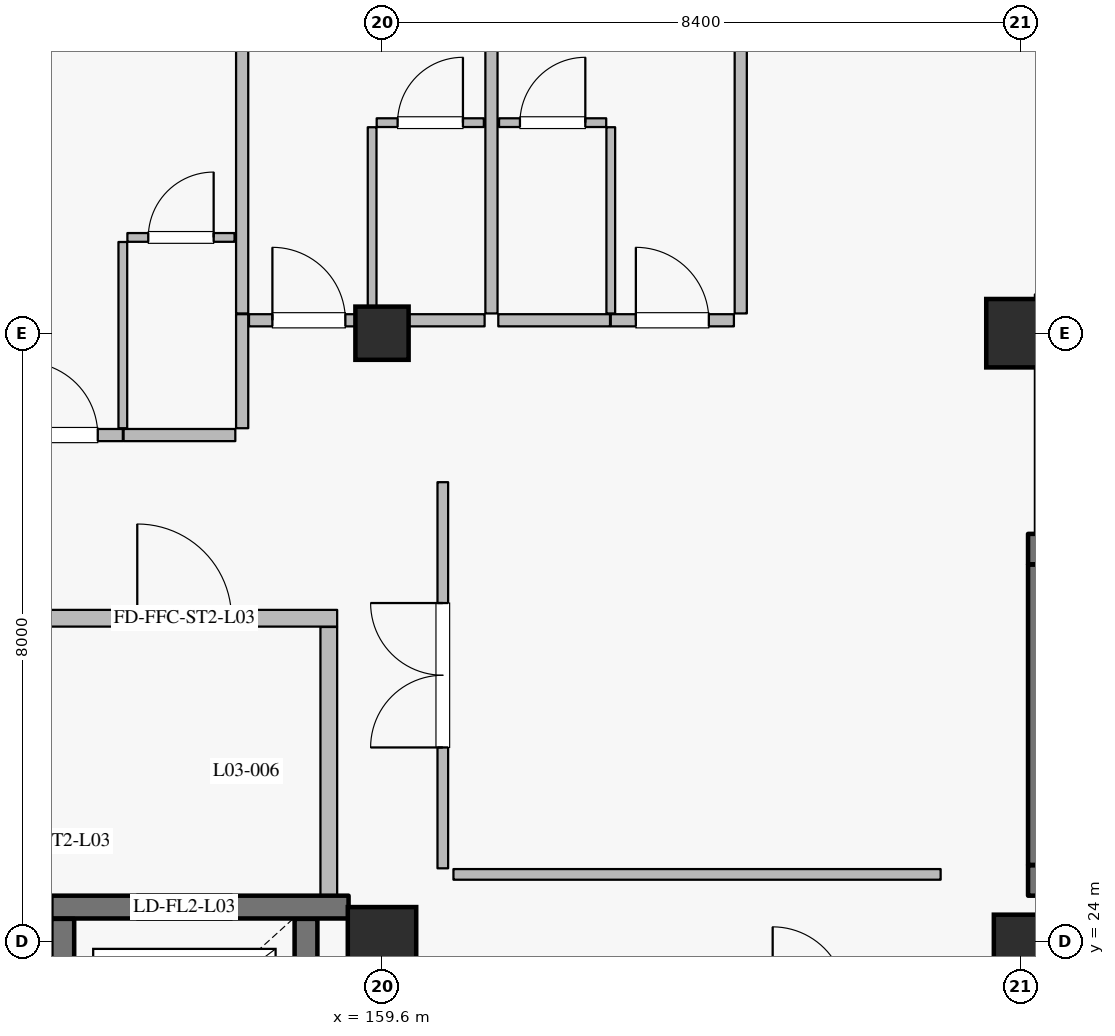
"""IFC4 building model, lengths in metres.
Left out: names, types, materials, properties, quantities, classifications, styles, units other than length and angle.
Written with IfcOpenShell. Run it as: python <this file> out.ifc"""

import sys

from ifc_helpers import new_model, si_unit, direction, frame, frame_2d, origin, origin_2d, place, context, subcontext, project, spatial, rectangle, extrude, element, fill, save


model = new_model("IFC4")
c1 = context("Model", 3, precision=1e-05, world=origin(), true_north=direction((0.0, 1.0)))
c2 = subcontext(c1, "Body", "Model", "MODEL_VIEW")
j1 = project(units=[si_unit("LENGTHUNIT", "METRE"), si_unit("PLANEANGLEUNIT", "RADIAN")], contexts=[c1])
p1 = place(None, origin())
s1 = spatial("IfcSite", under=j1, at=p1, CompositionType="ELEMENT")
p2 = place(p1, origin())
s2 = spatial("IfcBuilding", under=s1, at=p2, CompositionType="ELEMENT")
p3 = place(p2, frame((0.0, 0.0, 16.2)))
s3 = spatial("IfcBuildingStorey", under=s2, at=p3, CompositionType="ELEMENT", Elevation=16.2)
for number, where, z_axis, x_axis in (
    (1, (159.6, 24.0, 0.0), (0.0, 0.0, 1.0), (1.0, 0.0, 0.0)),
    (2, (168.0, 32.0, 0.0), (0.0, 0.0, 1.0), (1.0, 0.0, 0.0)),
):
    element("IfcColumn", number, at=place(p3, frame(where, z_axis=z_axis, x_axis=x_axis)), inside=s3, PredefinedType="COLUMN", context=c2, shape_type="SweptSolid", body=[
        extrude(rectangle(XDim=0.9, YDim=0.9, at=origin_2d()), origin(), (0.0, 0.0, 1.0), 4.8),
    ])
for number, where, z_axis, x_axis in (
    (3, (159.6, 32.0, 0.0), (0.0, 0.0, 1.0), (1.0, 0.0, 0.0)),
    (4, (168.0, 24.0, 0.0), (0.0, 0.0, 1.0), (1.0, 0.0, 0.0)),
):
    element("IfcColumn", number, at=place(p3, frame(where, z_axis=z_axis, x_axis=x_axis)), inside=s3, PredefinedType="COLUMN", context=c2, shape_type="SweptSolid", body=[
        extrude(rectangle(XDim=0.7, YDim=0.7, at=origin_2d()), origin(), (0.0, 0.0, 1.0), 4.8),
    ])
p4 = place(p3, frame((158.6, 21.705, 0.0), z_axis=(0.0, 0.0, 1.0), x_axis=(0.0, 1.0, 0.0)))
e5 = element("IfcWall", 5, at=p4, inside=s3, PredefinedType="SHEAR", context=c2, shape_type="SweptSolid", body=[
    extrude(rectangle(XDim=2.59, YDim=0.3, at=frame_2d((1.295, 0.0))), origin(), (0.0, 0.0, 1.0), 4.535),
])
p5 = place(p3, frame((159.16, 24.45, 0.0), z_axis=(0.0, 0.0, 1.0), x_axis=(-1.0, 0.0, 0.0)))
e6 = element("IfcWall", 6, at=p5, inside=s3, PredefinedType="SHEAR", context=c2, shape_type="SweptSolid", body=[
    extrude(rectangle(XDim=3.91, YDim=0.3, at=frame_2d((1.955, 0.0))), origin(), (0.0, 0.0, 1.0), 4.535),
])
p6 = place(p5, frame((1.535, 0.0, 0.0)))
e7 = element("IfcOpeningElement", 7, at=p6, cuts=e6, PredefinedType="OPENING", context=c2, shape_type="SweptSolid", body=[
    extrude(rectangle(XDim=1.25, YDim=2.25, at=frame_2d((0.625, 1.125))), frame((0.0, 0.16, 0.0), z_axis=(0.0, -1.0, 0.0), x_axis=(1.0, 0.0, 0.0)), (0.0, 0.0, 1.0), 0.32),
])
p7 = place(p3, frame((155.4, 24.295, 0.0), z_axis=(0.0, 0.0, 1.0), x_axis=(0.0, -1.0, 0.0)))
e8 = element("IfcWall", 8, at=p7, inside=s3, PredefinedType="SHEAR", context=c2, shape_type="SweptSolid", body=[
    extrude(rectangle(XDim=2.59, YDim=0.3, at=frame_2d((1.295, 0.0))), origin(), (0.0, 0.0, 1.0), 4.535),
])
p8 = place(p3, frame((158.9, 24.605, 0.0), z_axis=(0.0, 0.0, 1.0), x_axis=(0.0, 1.0, 0.0)))
e9 = element("IfcWall", 9, at=p8, inside=s3, PredefinedType="PARTITIONING", context=c2, shape_type="SweptSolid", body=[
    extrude(rectangle(XDim=3.53, YDim=0.22, at=frame_2d((1.765, 0.0))), origin(), (0.0, 0.0, 1.0), 4.535),
])
p9 = place(p3, frame((154.99, 28.25, 0.0), z_axis=(0.0, 0.0, 1.0), x_axis=(1.0, 0.0, 0.0)))
e10 = element("IfcWall", 10, at=p9, inside=s3, PredefinedType="PARTITIONING", context=c2, shape_type="SweptSolid", body=[
    extrude(rectangle(XDim=4.02, YDim=0.22, at=frame_2d((2.01, 0.0))), origin(), (0.0, 0.0, 1.0), 4.535),
])
p10 = place(p9, frame((1.39, 0.0, 0.0)))
e11 = element("IfcOpeningElement", 11, at=p10, cuts=e10, PredefinedType="OPENING", context=c2, shape_type="SweptSolid", body=[
    extrude(rectangle(XDim=1.24, YDim=2.2, at=frame_2d((0.62, 1.1))), frame((0.0, 0.12, 0.0), z_axis=(0.0, -1.0, 0.0), x_axis=(1.0, 0.0, 0.0)), (0.0, 0.0, 1.0), 0.24),
])
p11 = place(p3, frame((168.1, 24.8, 0.0), z_axis=(0.0, 0.0, 1.0), x_axis=(1.0, 0.0, 0.0)))
e12 = element("IfcWall", 12, at=p11, inside=s3, PredefinedType="SHEAR", context=c2, shape_type="SweptSolid", body=[
    extrude(rectangle(XDim=8.2, YDim=0.4, at=frame_2d((4.1, 0.0))), origin(), (0.0, 0.0, 1.0), 4.535),
])
p12 = place(p3, frame((168.1, 29.16, 0.0), z_axis=(0.0, 0.0, 1.0), x_axis=(1.0, 0.0, 0.0)))
e13 = element("IfcWall", 13, at=p12, inside=s3, PredefinedType="SHEAR", context=c2, shape_type="SweptSolid", body=[
    extrude(rectangle(XDim=8.2, YDim=0.4, at=frame_2d((4.1, 0.0))), origin(), (0.0, 0.0, 1.0), 4.535),
])
p13 = place(p12, frame((0.43, 0.0, 0.0)))
e14 = element("IfcOpeningElement", 14, at=p13, cuts=e13, PredefinedType="OPENING", context=c2, shape_type="SweptSolid", body=[
    extrude(rectangle(XDim=1.16, YDim=2.2, at=frame_2d((0.58, 1.1))), frame((0.0, 0.21, 0.0), z_axis=(0.0, -1.0, 0.0), x_axis=(1.0, 0.0, 0.0)), (0.0, 0.0, 1.0), 0.42),
])
p14 = place(p3, frame((168.3, 25.005, 0.0), z_axis=(0.0, 0.0, 1.0), x_axis=(0.0, 1.0, 0.0)))
e15 = element("IfcWall", 15, at=p14, inside=s3, PredefinedType="SHEAR", context=c2, shape_type="SweptSolid", body=[
    extrude(rectangle(XDim=3.95, YDim=0.4, at=frame_2d((1.975, 0.0))), origin(), (0.0, 0.0, 1.0), 4.535),
])
p15 = place(p3, frame((168.3, 29.365, 0.0), z_axis=(0.0, 0.0, 1.0), x_axis=(0.0, 1.0, 0.0)))
e16 = element("IfcWall", 16, at=p15, inside=s3, PredefinedType="PARTITIONING", context=c2, shape_type="SweptSolid", body=[
    extrude(rectangle(XDim=2.92, YDim=0.22, at=frame_2d((1.46, 0.0))), origin(), (0.0, 0.0, 1.0), 4.535),
])
p16 = place(p3, frame((168.19, 32.4, 0.0), z_axis=(0.0, 0.0, 1.0), x_axis=(1.0, 0.0, 0.0)))
e17 = element("IfcWall", 17, at=p16, inside=s3, PredefinedType="PARTITIONING", context=c2, shape_type="SweptSolid", body=[
    extrude(rectangle(XDim=4.22, YDim=0.22, at=frame_2d((2.11, 0.0))), origin(), (0.0, 0.0, 1.0), 4.535),
])
p17 = place(p16, frame((1.55, 0.0, 0.0)))
e18 = element("IfcOpeningElement", 18, at=p17, cuts=e17, PredefinedType="OPENING", context=c2, shape_type="SweptSolid", body=[
    extrude(rectangle(XDim=1.12, YDim=2.2, at=frame_2d((0.56, 1.1))), frame((0.0, 0.12, 0.0), z_axis=(0.0, -1.0, 0.0), x_axis=(1.0, 0.0, 0.0)), (0.0, 0.0, 1.0), 0.24),
])
p18 = place(p3, frame((154.57, 30.66, 0.0), z_axis=(0.0, 0.0, 1.0), x_axis=(1.0, 0.0, 0.0)))
e19 = element("IfcWall", 19, at=p18, inside=s3, PredefinedType="PARTITIONING", context=c2, shape_type="SweptSolid", body=[
    extrude(rectangle(XDim=1.62, YDim=0.16, at=frame_2d((0.81, 0.0))), origin(), (0.0, 0.0, 1.0), 4.535),
])
p19 = place(p18, frame((0.33, 0.0, 0.0)))
e20 = element("IfcOpeningElement", 20, at=p19, cuts=e19, PredefinedType="OPENING", context=c2, shape_type="SweptSolid", body=[
    extrude(rectangle(XDim=0.96, YDim=2.2, at=frame_2d((0.48, 1.1))), frame((0.0, 0.09, 0.0), z_axis=(0.0, -1.0, 0.0), x_axis=(1.0, 0.0, 0.0)), (0.0, 0.0, 1.0), 0.18),
])
p20 = place(p3, frame((156.2, 30.66, 0.0), z_axis=(0.0, 0.0, 1.0), x_axis=(1.0, 0.0, 0.0)))
e21 = element("IfcWall", 21, at=p20, inside=s3, PredefinedType="PARTITIONING", context=c2, shape_type="SweptSolid", body=[
    extrude(rectangle(XDim=1.47, YDim=0.16, at=frame_2d((0.735, 0.0))), origin(), (0.0, 0.0, 1.0), 4.535),
])
p21 = place(p3, frame((156.19, 30.75, 0.0), z_axis=(0.0, 0.0, 1.0), x_axis=(0.0, 1.0, 0.0)))
e22 = element("IfcWall", 22, at=p21, inside=s3, PredefinedType="PARTITIONING", context=c2, shape_type="SweptSolid", body=[
    extrude(rectangle(XDim=2.45, YDim=0.115, at=frame_2d((1.225, 0.0))), origin(), (0.0, 0.0, 1.0), 4.535),
])
p22 = place(p3, frame((156.25, 33.26, 0.0), z_axis=(0.0, 0.0, 1.0), x_axis=(1.0, 0.0, 0.0)))
e23 = element("IfcWall", 23, at=p22, inside=s3, PredefinedType="PARTITIONING", context=c2, shape_type="SweptSolid", body=[
    extrude(rectangle(XDim=1.41, YDim=0.115, at=frame_2d((0.705, 0.0))), origin(), (0.0, 0.0, 1.0), 4.535),
])
p23 = place(p22, frame((0.275, 0.0, 0.0)))
e24 = element("IfcOpeningElement", 24, at=p23, cuts=e23, PredefinedType="OPENING", context=c2, shape_type="SweptSolid", body=[
    extrude(rectangle(XDim=0.86, YDim=2.12, at=frame_2d((0.43, 1.06))), frame((0.0, 0.067, 0.0), z_axis=(0.0, -1.0, 0.0), x_axis=(1.0, 0.0, 0.0)), (0.0, 0.0, 1.0), 0.135),
])
p24 = place(p3, frame((157.76, 30.75, 0.0), z_axis=(0.0, 0.0, 1.0), x_axis=(0.0, 1.0, 0.0)))
e25 = element("IfcWall", 25, at=p24, inside=s3, PredefinedType="PARTITIONING", context=c2, shape_type="SweptSolid", body=[
    extrude(rectangle(XDim=1.5, YDim=0.16, at=frame_2d((0.75, 0.0))), origin(), (0.0, 0.0, 1.0), 4.535),
])
p25 = place(p3, frame((157.85, 32.17, 0.0), z_axis=(0.0, 0.0, 1.0), x_axis=(1.0, 0.0, 0.0)))
e26 = element("IfcWall", 26, at=p25, inside=s3, PredefinedType="PARTITIONING", context=c2, shape_type="SweptSolid", body=[
    extrude(rectangle(XDim=1.62, YDim=0.16, at=frame_2d((0.81, 0.0))), origin(), (0.0, 0.0, 1.0), 4.535),
])
p26 = place(p25, frame((0.308, 0.0, 0.0)))
e27 = element("IfcOpeningElement", 27, at=p26, cuts=e26, PredefinedType="OPENING", context=c2, shape_type="SweptSolid", body=[
    extrude(rectangle(XDim=0.96, YDim=2.2, at=frame_2d((0.48, 1.1))), frame((0.0, 0.09, 0.0), z_axis=(0.0, -1.0, 0.0), x_axis=(1.0, 0.0, 0.0)), (0.0, 0.0, 1.0), 0.18),
])
p27 = place(p3, frame((159.48, 32.17, 0.0), z_axis=(0.0, 0.0, 1.0), x_axis=(1.0, 0.0, 0.0)))
e28 = element("IfcWall", 28, at=p27, inside=s3, PredefinedType="PARTITIONING", context=c2, shape_type="SweptSolid", body=[
    extrude(rectangle(XDim=1.47, YDim=0.16, at=frame_2d((0.735, 0.0))), origin(), (0.0, 0.0, 1.0), 4.535),
])
p28 = place(p3, frame((159.47, 32.26, 0.0), z_axis=(0.0, 0.0, 1.0), x_axis=(0.0, 1.0, 0.0)))
e29 = element("IfcWall", 29, at=p28, inside=s3, PredefinedType="PARTITIONING", context=c2, shape_type="SweptSolid", body=[
    extrude(rectangle(XDim=2.45, YDim=0.115, at=frame_2d((1.225, 0.0))), origin(), (0.0, 0.0, 1.0), 4.535),
])
p29 = place(p3, frame((159.53, 34.77, 0.0), z_axis=(0.0, 0.0, 1.0), x_axis=(1.0, 0.0, 0.0)))
e30 = element("IfcWall", 30, at=p29, inside=s3, PredefinedType="PARTITIONING", context=c2, shape_type="SweptSolid", body=[
    extrude(rectangle(XDim=1.41, YDim=0.115, at=frame_2d((0.705, 0.0))), origin(), (0.0, 0.0, 1.0), 4.535),
])
p30 = place(p29, frame((0.275, 0.0, 0.0)))
e31 = element("IfcOpeningElement", 31, at=p30, cuts=e30, PredefinedType="OPENING", context=c2, shape_type="SweptSolid", body=[
    extrude(rectangle(XDim=0.86, YDim=2.12, at=frame_2d((0.43, 1.06))), frame((0.0, 0.067, 0.0), z_axis=(0.0, -1.0, 0.0), x_axis=(1.0, 0.0, 0.0)), (0.0, 0.0, 1.0), 0.135),
])
p31 = place(p3, frame((157.76, 32.26, 0.0), z_axis=(0.0, 0.0, 1.0), x_axis=(0.0, 1.0, 0.0)))
e32 = element("IfcWall", 32, at=p31, inside=s3, PredefinedType="PARTITIONING", context=c2, shape_type="SweptSolid", body=[
    extrude(rectangle(XDim=7.4, YDim=0.16, at=frame_2d((3.7, 0.0))), origin(), (0.0, 0.0, 1.0), 4.535),
])
p32 = place(p3, frame((161.13, 32.17, 0.0), z_axis=(0.0, 0.0, 1.0), x_axis=(1.0, 0.0, 0.0)))
e33 = element("IfcWall", 33, at=p32, inside=s3, PredefinedType="PARTITIONING", context=c2, shape_type="SweptSolid", body=[
    extrude(rectangle(XDim=1.47, YDim=0.16, at=frame_2d((0.735, 0.0))), origin(), (0.0, 0.0, 1.0), 4.535),
])
p33 = place(p3, frame((162.61, 32.17, 0.0), z_axis=(0.0, 0.0, 1.0), x_axis=(1.0, 0.0, 0.0)))
e34 = element("IfcWall", 34, at=p33, inside=s3, PredefinedType="PARTITIONING", context=c2, shape_type="SweptSolid", body=[
    extrude(rectangle(XDim=1.62, YDim=0.16, at=frame_2d((0.81, 0.0))), origin(), (0.0, 0.0, 1.0), 4.535),
])
p34 = place(p33, frame((0.33, 0.0, 0.0)))
e35 = element("IfcOpeningElement", 35, at=p34, cuts=e34, PredefinedType="OPENING", context=c2, shape_type="SweptSolid", body=[
    extrude(rectangle(XDim=0.96, YDim=2.2, at=frame_2d((0.48, 1.1))), frame((0.0, 0.09, 0.0), z_axis=(0.0, -1.0, 0.0), x_axis=(1.0, 0.0, 0.0)), (0.0, 0.0, 1.0), 0.18),
])
p35 = place(p3, frame((162.61, 32.26, 0.0), z_axis=(0.0, 0.0, 1.0), x_axis=(0.0, 1.0, 0.0)))
e36 = element("IfcWall", 36, at=p35, inside=s3, PredefinedType="PARTITIONING", context=c2, shape_type="SweptSolid", body=[
    extrude(rectangle(XDim=2.45, YDim=0.115, at=frame_2d((1.225, 0.0))), origin(), (0.0, 0.0, 1.0), 4.535),
])
p36 = place(p3, frame((161.14, 34.77, 0.0), z_axis=(0.0, 0.0, 1.0), x_axis=(1.0, 0.0, 0.0)))
e37 = element("IfcWall", 37, at=p36, inside=s3, PredefinedType="PARTITIONING", context=c2, shape_type="SweptSolid", body=[
    extrude(rectangle(XDim=1.41, YDim=0.115, at=frame_2d((0.705, 0.0))), origin(), (0.0, 0.0, 1.0), 4.535),
])
p37 = place(p36, frame((0.275, 0.0, 0.0)))
e38 = element("IfcOpeningElement", 38, at=p37, cuts=e37, PredefinedType="OPENING", context=c2, shape_type="SweptSolid", body=[
    extrude(rectangle(XDim=0.86, YDim=2.12, at=frame_2d((0.43, 1.06))), frame((0.0, 0.067, 0.0), z_axis=(0.0, -1.0, 0.0), x_axis=(1.0, 0.0, 0.0)), (0.0, 0.0, 1.0), 0.135),
])
p38 = place(p3, frame((161.04, 32.26, 0.0), z_axis=(0.0, 0.0, 1.0), x_axis=(0.0, 1.0, 0.0)))
e39 = element("IfcWall", 39, at=p38, inside=s3, PredefinedType="PARTITIONING", context=c2, shape_type="SweptSolid", body=[
    extrude(rectangle(XDim=8.77, YDim=0.16, at=frame_2d((4.385, 0.0))), origin(), (0.0, 0.0, 1.0), 4.535),
])
p39 = place(p3, frame((164.32, 32.26, 0.0), z_axis=(0.0, 0.0, 1.0), x_axis=(0.0, 1.0, 0.0)))
e40 = element("IfcWall", 40, at=p39, inside=s3, PredefinedType="PARTITIONING", context=c2, shape_type="SweptSolid", body=[
    extrude(rectangle(XDim=8.64, YDim=0.16, at=frame_2d((4.32, 0.0))), origin(), (0.0, 0.0, 1.0), 4.535),
])
p40 = place(p3, frame((160.4, 24.96, 0.0), z_axis=(0.0, 0.0, 1.0), x_axis=(0.0, 1.0, 0.0)))
e41 = element("IfcWall", 41, at=p40, inside=s3, PredefinedType="PARTITIONING", context=c2, shape_type="SweptSolid", body=[
    extrude(rectangle(XDim=5.08, YDim=0.14, at=frame_2d((2.54, 0.0))), origin(), (0.0, 0.0, 1.0), 4.535),
])
p41 = place(p40, frame((1.59, 0.0, 0.0)))
e42 = element("IfcOpeningElement", 42, at=p41, cuts=e41, PredefinedType="OPENING", context=c2, shape_type="SweptSolid", body=[
    extrude(rectangle(XDim=1.9, YDim=2.4, at=frame_2d((0.95, 1.2))), frame((0.0, 0.08, 0.0), z_axis=(0.0, -1.0, 0.0), x_axis=(1.0, 0.0, 0.0)), (0.0, 0.0, 1.0), 0.16),
])
p42 = place(p3, frame((160.54, 24.88, 0.0), z_axis=(0.0, 0.0, 1.0), x_axis=(1.0, 0.0, 0.0)))
e43 = element("IfcWall", 43, at=p42, inside=s3, PredefinedType="PARTITIONING", context=c2, shape_type="SweptSolid", body=[
    extrude(rectangle(XDim=6.41, YDim=0.14, at=frame_2d((3.205, 0.0))), origin(), (0.0, 0.0, 1.0), 4.535),
])
p43 = place(p6, origin())
e44 = element("IfcDoor", 44, at=p43, inside=s3, OperationType="DOUBLE_DOOR_SLIDING", PredefinedType="DOOR", context=c2, shape_type="SweptSolid", body=[
    extrude(rectangle(XDim=1.25, YDim=2.25, at=frame_2d((0.625, 1.125))), frame((0.0, 0.025, 0.0), z_axis=(0.0, -1.0, 0.0), x_axis=(1.0, 0.0, 0.0)), (0.0, 0.0, 1.0), 0.05),
])
fill(e7, e44)
p44 = place(p10, origin())
e45 = element("IfcDoor", 45, at=p44, inside=s3, OperationType="SINGLE_SWING_LEFT", PredefinedType="DOOR", context=c2, shape_type="SweptSolid", body=[
    extrude(rectangle(XDim=1.24, YDim=2.2, at=frame_2d((0.62, 1.1))), frame((0.0, 0.025, 0.0), z_axis=(0.0, -1.0, 0.0), x_axis=(1.0, 0.0, 0.0)), (0.0, 0.0, 1.0), 0.05),
])
fill(e11, e45)
p45 = place(p19, origin())
e46 = element("IfcDoor", 46, at=p45, inside=s3, OperationType="SINGLE_SWING_LEFT", PredefinedType="DOOR", context=c2, shape_type="SweptSolid", body=[
    extrude(rectangle(XDim=0.96, YDim=2.2, at=frame_2d((0.48, 1.1))), frame((0.0, 0.025, 0.0), z_axis=(0.0, -1.0, 0.0), x_axis=(1.0, 0.0, 0.0)), (0.0, 0.0, 1.0), 0.05),
])
fill(e20, e46)
p46 = place(p23, origin())
e47 = element("IfcDoor", 47, at=p46, inside=s3, OperationType="SINGLE_SWING_RIGHT", PredefinedType="DOOR", context=c2, shape_type="SweptSolid", body=[
    extrude(rectangle(XDim=0.86, YDim=2.12, at=frame_2d((0.43, 1.06))), frame((0.0, 0.025, 0.0), z_axis=(0.0, -1.0, 0.0), x_axis=(1.0, 0.0, 0.0)), (0.0, 0.0, 1.0), 0.05),
])
fill(e24, e47)
p47 = place(p26, origin())
e48 = element("IfcDoor", 48, at=p47, inside=s3, OperationType="SINGLE_SWING_LEFT", PredefinedType="DOOR", context=c2, shape_type="SweptSolid", body=[
    extrude(rectangle(XDim=0.96, YDim=2.2, at=frame_2d((0.48, 1.1))), frame((0.0, 0.025, 0.0), z_axis=(0.0, -1.0, 0.0), x_axis=(1.0, 0.0, 0.0)), (0.0, 0.0, 1.0), 0.05),
])
fill(e27, e48)
p48 = place(p30, origin())
e49 = element("IfcDoor", 49, at=p48, inside=s3, OperationType="SINGLE_SWING_RIGHT", PredefinedType="DOOR", context=c2, shape_type="SweptSolid", body=[
    extrude(rectangle(XDim=0.86, YDim=2.12, at=frame_2d((0.43, 1.06))), frame((0.0, 0.025, 0.0), z_axis=(0.0, -1.0, 0.0), x_axis=(1.0, 0.0, 0.0)), (0.0, 0.0, 1.0), 0.05),
])
fill(e31, e49)
p49 = place(p34, origin())
e50 = element("IfcDoor", 50, at=p49, inside=s3, OperationType="SINGLE_SWING_LEFT", PredefinedType="DOOR", context=c2, shape_type="SweptSolid", body=[
    extrude(rectangle(XDim=0.96, YDim=2.2, at=frame_2d((0.48, 1.1))), frame((0.0, 0.025, 0.0), z_axis=(0.0, -1.0, 0.0), x_axis=(1.0, 0.0, 0.0)), (0.0, 0.0, 1.0), 0.05),
])
fill(e35, e50)
p50 = place(p37, origin())
e51 = element("IfcDoor", 51, at=p50, inside=s3, OperationType="SINGLE_SWING_RIGHT", PredefinedType="DOOR", context=c2, shape_type="SweptSolid", body=[
    extrude(rectangle(XDim=0.86, YDim=2.12, at=frame_2d((0.43, 1.06))), frame((0.0, 0.025, 0.0), z_axis=(0.0, -1.0, 0.0), x_axis=(1.0, 0.0, 0.0)), (0.0, 0.0, 1.0), 0.05),
])
fill(e38, e51)
p51 = place(p41, origin())
e52 = element("IfcDoor", 52, at=p51, inside=s3, OperationType="DOUBLE_DOOR_SINGLE_SWING", PredefinedType="DOOR", context=c2, shape_type="SweptSolid", body=[
    extrude(rectangle(XDim=1.9, YDim=2.4, at=frame_2d((0.95, 1.2))), frame((0.0, 0.025, 0.0), z_axis=(0.0, -1.0, 0.0), x_axis=(1.0, 0.0, 0.0)), (0.0, 0.0, 1.0), 0.05),
])
fill(e42, e52)
save(model, sys.argv[1])
